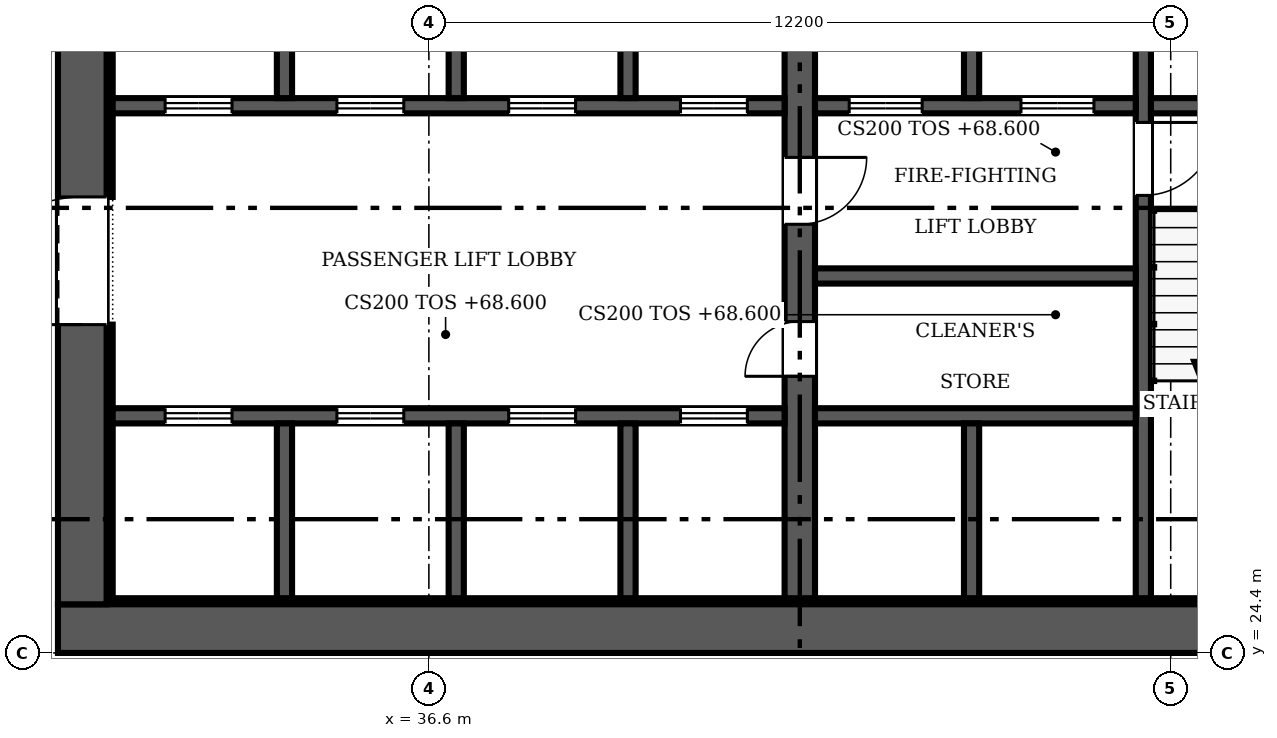
"""IFC4 building model, lengths in metres.
Left out: names, types, materials, properties, quantities, classifications, styles, units other than length and angle.
Written with IfcOpenShell. Run it as: python <this file> out.ifc"""

import sys

from ifc_helpers import new_model, si_unit, direction, frame, frame_2d, origin, place, context, subcontext, project, spatial, rectangle, extrude, source, transform, mapped, element, fill, save


model = new_model("IFC4")
c1 = context("Model", 3, precision=1e-05, world=origin(), true_north=direction((0.0, 1.0)))
c2 = subcontext(c1, "Body", "Model", "MODEL_VIEW")
j1 = project(units=[si_unit("LENGTHUNIT", "METRE"), si_unit("PLANEANGLEUNIT", "RADIAN")], contexts=[c1])
p1 = place(None, origin())
s1 = spatial("IfcSite", under=j1, at=p1, CompositionType="ELEMENT")
p2 = place(p1, origin())
s2 = spatial("IfcBuilding", under=s1, at=p2, CompositionType="ELEMENT")
p3 = place(p2, frame((0.0, 0.0, 68.6)))
s3 = spatial("IfcBuildingStorey", under=s2, at=p3, CompositionType="ELEMENT", Elevation=68.6)
p4 = place(p3, frame((54.9, 24.8, 0.0), z_axis=(0.0, 0.0, 1.0), x_axis=(-1.0, 0.0, 0.0)))
e1 = element("IfcWall", 1, at=p4, inside=s3, PredefinedType="SHEAR", context=c2, shape_type="SweptSolid", body=[
    extrude(rectangle(XDim=24.4, YDim=0.8, at=frame_2d((12.2, 0.0))), origin(), (0.0, 0.0, 1.0), 3.8),
])
m1 = source(origin(), c2, "Body", "SweptSolid", [
    extrude(rectangle(XDim=1.2, YDim=2.1, at=frame_2d((0.6, 1.05))), frame((0.0, 0.41, 0.0), z_axis=(0.0, -1.0, 0.0), x_axis=(1.0, 0.0, 0.0)), (0.0, 0.0, 1.0), 0.82),
])
p5 = place(p4, frame((1.5, 0.0, 0.0)))
e2 = element("IfcOpeningElement", 2, at=p5, cuts=e1, PredefinedType="OPENING", context=c2, shape_type="MappedRepresentation", body=[
    mapped(m1, transform((0.0, 0.0, 0.0), scale=1.0)),
])
p6 = place(p3, frame((30.9, 25.2, 0.0), z_axis=(0.0, 0.0, 1.0), x_axis=(0.0, 1.0, 0.0)))
e3 = element("IfcWall", 3, at=p6, inside=s3, PredefinedType="SHEAR", context=c2, shape_type="SweptSolid", body=[
    extrude(rectangle(XDim=22.8, YDim=0.8, at=frame_2d((11.4, 0.0))), origin(), (0.0, 0.0, 1.0), 3.8),
])
m2 = source(origin(), c2, "Body", "SweptSolid", [
    extrude(rectangle(XDim=2.1, YDim=2.4, at=frame_2d((1.05, 1.2))), frame((0.0, 0.41, 0.0), z_axis=(0.0, -1.0, 0.0), x_axis=(1.0, 0.0, 0.0)), (0.0, 0.0, 1.0), 0.82),
])
p7 = place(p6, frame((4.6, 0.0, 0.0)))
e4 = element("IfcOpeningElement", 4, at=p7, cuts=e3, PredefinedType="OPENING", context=c2, shape_type="MappedRepresentation", body=[
    mapped(m2, transform((0.0, 0.0, 0.0), scale=1.0)),
])
p8 = place(p6, frame((16.1, 0.0, 0.0)))
e5 = element("IfcOpeningElement", 5, at=p8, cuts=e3, PredefinedType="OPENING", context=c2, shape_type="MappedRepresentation", body=[
    mapped(m2, transform((0.0, 0.0, 0.0), scale=1.0)),
])
p9 = place(p3, frame((31.3, 25.25, 0.0), z_axis=(0.0, 0.0, 1.0), x_axis=(1.0, 0.0, 0.0)))
e6 = element("IfcWall", 6, at=p9, inside=s3, PredefinedType="SOLIDWALL", context=c2, shape_type="SweptSolid", body=[
    extrude(rectangle(XDim=20.9, YDim=0.1, at=frame_2d((10.45, 0.0))), origin(), (0.0, 0.0, 1.0), 3.8),
])
p10 = place(p3, frame((31.35, 25.3, 0.0), z_axis=(0.0, 0.0, 1.0), x_axis=(0.0, 1.0, 0.0)))
e7 = element("IfcWall", 7, at=p10, inside=s3, PredefinedType="SOLIDWALL", context=c2, shape_type="SweptSolid", body=[
    extrude(rectangle(XDim=4.5, YDim=0.1, at=frame_2d((2.25, 0.0))), origin(), (0.0, 0.0, 1.0), 3.8),
])
p11 = place(p3, frame((31.35, 31.9, 0.0), z_axis=(0.0, 0.0, 1.0), x_axis=(0.0, 1.0, 0.0)))
e8 = element("IfcWall", 8, at=p11, inside=s3, PredefinedType="SOLIDWALL", context=c2, shape_type="SweptSolid", body=[
    extrude(rectangle(XDim=9.4, YDim=0.1, at=frame_2d((4.7, 0.0))), origin(), (0.0, 0.0, 1.0), 3.8),
])
p12 = place(p3, frame((42.7, 36.35, 0.0), z_axis=(0.0, 0.0, 1.0), x_axis=(0.0, -1.0, 0.0)))
e9 = element("IfcWall", 9, at=p12, inside=s3, PredefinedType="SHEAR", context=c2, shape_type="SweptSolid", body=[
    extrude(rectangle(XDim=11.05, YDim=0.5, at=frame_2d((5.525, 0.0))), origin(), (0.0, 0.0, 1.0), 3.8),
])
m3 = source(origin(), c2, "Body", "SweptSolid", [
    extrude(rectangle(XDim=0.9, YDim=2.1, at=frame_2d((0.45, 1.05))), frame((0.0, 0.26, 0.0), z_axis=(0.0, -1.0, 0.0), x_axis=(1.0, 0.0, 0.0)), (0.0, 0.0, 1.0), 0.52),
])
p13 = place(p12, frame((6.5, 0.0, 0.0)))
e10 = element("IfcOpeningElement", 10, at=p13, cuts=e9, PredefinedType="OPENING", context=c2, shape_type="MappedRepresentation", body=[
    mapped(m3, transform((0.0, 0.0, 0.0), scale=1.0)),
])
m4 = source(origin(), c2, "Body", "SweptSolid", [
    extrude(rectangle(XDim=1.1, YDim=2.1, at=frame_2d((0.55, 1.05))), frame((0.0, 0.26, 0.0), z_axis=(0.0, -1.0, 0.0), x_axis=(1.0, 0.0, 0.0)), (0.0, 0.0, 1.0), 0.52),
])
p14 = place(p12, frame((3.8, 0.0, 0.0)))
e11 = element("IfcOpeningElement", 11, at=p14, cuts=e9, PredefinedType="OPENING", context=c2, shape_type="MappedRepresentation", body=[
    mapped(m4, transform((0.0, 0.0, 0.0), scale=1.0)),
])
p15 = place(p3, frame((48.35, 36.35, 0.0), z_axis=(0.0, 0.0, 1.0), x_axis=(0.0, -1.0, 0.0)))
e12 = element("IfcWall", 12, at=p15, inside=s3, PredefinedType="SOLIDWALL", context=c2, shape_type="SweptSolid", body=[
    extrude(rectangle(XDim=11.05, YDim=0.25, at=frame_2d((5.525, 0.0))), origin(), (0.0, 0.0, 1.0), 3.8),
])
m5 = source(origin(), c2, "Body", "SweptSolid", [
    extrude(rectangle(XDim=1.2, YDim=2.1, at=frame_2d((0.6, 1.05))), frame((0.0, 0.135, 0.0), z_axis=(0.0, -1.0, 0.0), x_axis=(1.0, 0.0, 0.0)), (0.0, 0.0, 1.0), 0.27),
])
p16 = place(p15, frame((3.225, 0.0, 0.0)))
e13 = element("IfcOpeningElement", 13, at=p16, cuts=e12, PredefinedType="OPENING", context=c2, shape_type="MappedRepresentation", body=[
    mapped(m5, transform((0.0, 0.0, 0.0), scale=1.0)),
])
p17 = place(p3, frame((42.45, 33.4, 0.0), z_axis=(0.0, 0.0, 1.0), x_axis=(-1.0, 0.0, 0.0)))
e14 = element("IfcWall", 14, at=p17, inside=s3, PredefinedType="SOLIDWALL", context=c2, shape_type="SweptSolid", body=[
    extrude(rectangle(XDim=11.05, YDim=0.25, at=frame_2d((5.525, 0.0))), origin(), (0.0, 0.0, 1.0), 3.8),
])
m6 = source(origin(), c2, "Body", "SweptSolid", [
    extrude(rectangle(XDim=1.1, YDim=2.1, at=frame_2d((0.55, 1.05))), frame((0.0, 0.135, 0.0), z_axis=(0.0, -1.0, 0.0), x_axis=(1.0, 0.0, 0.0)), (0.0, 0.0, 1.0), 0.27),
])
p18 = place(p17, frame((9.087, 0.0, 0.0)))
e15 = element("IfcOpeningElement", 15, at=p18, cuts=e14, PredefinedType="OPENING", context=c2, shape_type="MappedRepresentation", body=[
    mapped(m6, transform((0.0, 0.0, 0.0), scale=1.0)),
])
p19 = place(p17, frame((6.262, 0.0, 0.0)))
e16 = element("IfcOpeningElement", 16, at=p19, cuts=e14, PredefinedType="OPENING", context=c2, shape_type="MappedRepresentation", body=[
    mapped(m6, transform((0.0, 0.0, 0.0), scale=1.0)),
])
p20 = place(p17, frame((3.438, 0.0, 0.0)))
e17 = element("IfcOpeningElement", 17, at=p20, cuts=e14, PredefinedType="OPENING", context=c2, shape_type="MappedRepresentation", body=[
    mapped(m6, transform((0.0, 0.0, 0.0), scale=1.0)),
])
p21 = place(p17, frame((0.613, 0.0, 0.0)))
e18 = element("IfcOpeningElement", 18, at=p21, cuts=e14, PredefinedType="OPENING", context=c2, shape_type="MappedRepresentation", body=[
    mapped(m6, transform((0.0, 0.0, 0.0), scale=1.0)),
])
p22 = place(p3, frame((48.225, 33.4, 0.0), z_axis=(0.0, 0.0, 1.0), x_axis=(-1.0, 0.0, 0.0)))
e19 = element("IfcWall", 19, at=p22, inside=s3, PredefinedType="SOLIDWALL", context=c2, shape_type="SweptSolid", body=[
    extrude(rectangle(XDim=5.275, YDim=0.25, at=frame_2d((2.638, 0.0))), origin(), (0.0, 0.0, 1.0), 3.8),
])
p23 = place(p22, frame((3.512, 0.0, 0.0)))
e20 = element("IfcOpeningElement", 20, at=p23, cuts=e19, PredefinedType="OPENING", context=c2, shape_type="MappedRepresentation", body=[
    mapped(m5, transform((0.0, 0.0, 0.0), scale=1.0)),
])
p24 = place(p22, frame((0.688, 0.0, 0.0)))
e21 = element("IfcOpeningElement", 21, at=p24, cuts=e19, PredefinedType="OPENING", context=c2, shape_type="MappedRepresentation", body=[
    mapped(m5, transform((0.0, 0.0, 0.0), scale=1.0)),
])
p25 = place(p3, frame((48.475, 33.4, 0.0), z_axis=(0.0, 0.0, 1.0), x_axis=(1.0, 0.0, 0.0)))
e22 = element("IfcWall", 22, at=p25, inside=s3, PredefinedType="SOLIDWALL", context=c2, shape_type="SweptSolid", body=[
    extrude(rectangle(XDim=3.525, YDim=0.25, at=frame_2d((1.762, 0.0))), origin(), (0.0, 0.0, 1.0), 3.8),
])
p26 = place(p3, frame((31.4, 28.3, 0.0), z_axis=(0.0, 0.0, 1.0), x_axis=(1.0, 0.0, 0.0)))
e23 = element("IfcWall", 23, at=p26, inside=s3, PredefinedType="SOLIDWALL", context=c2, shape_type="SweptSolid", body=[
    extrude(rectangle(XDim=11.05, YDim=0.25, at=frame_2d((5.525, 0.0))), origin(), (0.0, 0.0, 1.0), 3.8),
])
p27 = place(p26, frame((0.863, 0.0, 0.0)))
e24 = element("IfcOpeningElement", 24, at=p27, cuts=e23, PredefinedType="OPENING", context=c2, shape_type="MappedRepresentation", body=[
    mapped(m6, transform((0.0, 0.0, 0.0), scale=1.0)),
])
p28 = place(p26, frame((3.688, 0.0, 0.0)))
e25 = element("IfcOpeningElement", 25, at=p28, cuts=e23, PredefinedType="OPENING", context=c2, shape_type="MappedRepresentation", body=[
    mapped(m6, transform((0.0, 0.0, 0.0), scale=1.0)),
])
p29 = place(p26, frame((6.512, 0.0, 0.0)))
e26 = element("IfcOpeningElement", 26, at=p29, cuts=e23, PredefinedType="OPENING", context=c2, shape_type="MappedRepresentation", body=[
    mapped(m6, transform((0.0, 0.0, 0.0), scale=1.0)),
])
p30 = place(p26, frame((9.337, 0.0, 0.0)))
e27 = element("IfcOpeningElement", 27, at=p30, cuts=e23, PredefinedType="OPENING", context=c2, shape_type="MappedRepresentation", body=[
    mapped(m6, transform((0.0, 0.0, 0.0), scale=1.0)),
])
p31 = place(p3, frame((42.95, 28.3, 0.0), z_axis=(0.0, 0.0, 1.0), x_axis=(1.0, 0.0, 0.0)))
e28 = element("IfcWall", 28, at=p31, inside=s3, PredefinedType="SOLIDWALL", context=c2, shape_type="SweptSolid", body=[
    extrude(rectangle(XDim=5.275, YDim=0.25, at=frame_2d((2.638, 0.0))), origin(), (0.0, 0.0, 1.0), 3.8),
])
p32 = place(p3, frame((45.525, 33.525, 0.0), z_axis=(0.0, 0.0, 1.0), x_axis=(0.0, 1.0, 0.0)))
e29 = element("IfcWall", 29, at=p32, inside=s3, PredefinedType="SOLIDWALL", context=c2, shape_type="SweptSolid", body=[
    extrude(rectangle(XDim=2.825, YDim=0.25, at=frame_2d((1.413, 0.0))), origin(), (0.0, 0.0, 1.0), 3.8),
])
p33 = place(p3, frame((42.95, 30.6, 0.0), z_axis=(0.0, 0.0, 1.0), x_axis=(1.0, 0.0, 0.0)))
e30 = element("IfcWall", 30, at=p33, inside=s3, PredefinedType="SOLIDWALL", context=c2, shape_type="SweptSolid", body=[
    extrude(rectangle(XDim=5.275, YDim=0.25, at=frame_2d((2.638, 0.0))), origin(), (0.0, 0.0, 1.0), 3.8),
])
for number, where, z_axis, x_axis in (
    (31, (34.225, 33.525, 0.0), (0.0, 0.0, 1.0), (0.0, 1.0, 0.0)),
    (32, (37.05, 33.525, 0.0), (0.0, 0.0, 1.0), (0.0, 1.0, 0.0)),
    (33, (39.875, 33.525, 0.0), (0.0, 0.0, 1.0), (0.0, 1.0, 0.0)),
):
    element("IfcWall", number, at=place(p3, frame(where, z_axis=z_axis, x_axis=x_axis)), inside=s3, PredefinedType="SOLIDWALL", context=c2, shape_type="SweptSolid", body=[
        extrude(rectangle(XDim=2.825, YDim=0.25, at=frame_2d((1.413, 0.0))), origin(), (0.0, 0.0, 1.0), 3.8),
    ])
for number, where, z_axis, x_axis in (
    (34, (34.225, 25.3, 0.0), (0.0, 0.0, 1.0), (0.0, 1.0, 0.0)),
    (35, (37.05, 25.3, 0.0), (0.0, 0.0, 1.0), (0.0, 1.0, 0.0)),
    (36, (39.875, 25.3, 0.0), (0.0, 0.0, 1.0), (0.0, 1.0, 0.0)),
    (37, (45.525, 25.3, 0.0), (0.0, 0.0, 1.0), (0.0, 1.0, 0.0)),
):
    element("IfcWall", number, at=place(p3, frame(where, z_axis=z_axis, x_axis=x_axis)), inside=s3, PredefinedType="SOLIDWALL", context=c2, shape_type="SweptSolid", body=[
        extrude(rectangle(XDim=2.875, YDim=0.25, at=frame_2d((1.438, 0.0))), origin(), (0.0, 0.0, 1.0), 3.8),
    ])
m7 = source(origin(), c2, "Body", "SweptSolid", [
    extrude(rectangle(XDim=2.1, YDim=2.4, at=frame_2d((1.05, 1.2))), frame((0.0, 0.025, 0.0), z_axis=(0.0, -1.0, 0.0), x_axis=(1.0, 0.0, 0.0)), (0.0, 0.0, 1.0), 0.05),
])
p34 = place(p7, origin())
e38 = element("IfcDoor", 38, at=p34, inside=s3, OperationType="DOUBLE_DOOR_SINGLE_SWING", PredefinedType="DOOR", context=c2, shape_type="MappedRepresentation", body=[
    mapped(m7, transform((0.0, 0.0, 0.0), scale=1.0)),
])
fill(e4, e38)
m8 = source(origin(), c2, "Body", "SweptSolid", [
    extrude(rectangle(XDim=0.9, YDim=2.1, at=frame_2d((0.45, 1.05))), frame((0.0, 0.025, 0.0), z_axis=(0.0, -1.0, 0.0), x_axis=(1.0, 0.0, 0.0)), (0.0, 0.0, 1.0), 0.05),
])
p35 = place(p13, origin())
e39 = element("IfcDoor", 39, at=p35, inside=s3, OperationType="SINGLE_SWING_RIGHT", PredefinedType="DOOR", context=c2, shape_type="MappedRepresentation", body=[
    mapped(m8, transform((0.0, 0.0, 0.0), scale=1.0)),
])
fill(e10, e39)
m9 = source(origin(), c2, "Body", "SweptSolid", [
    extrude(rectangle(XDim=1.1, YDim=2.1, at=frame_2d((0.55, 1.05))), frame((0.0, 0.025, 0.0), z_axis=(0.0, -1.0, 0.0), x_axis=(1.0, 0.0, 0.0)), (0.0, 0.0, 1.0), 0.05),
])
p36 = place(p14, origin())
e40 = element("IfcDoor", 40, at=p36, inside=s3, OperationType="SINGLE_SWING_LEFT", PredefinedType="DOOR", context=c2, shape_type="MappedRepresentation", body=[
    mapped(m9, transform((0.0, 0.0, 0.0), scale=1.0)),
])
fill(e11, e40)
m10 = source(origin(), c2, "Body", "SweptSolid", [
    extrude(rectangle(XDim=1.2, YDim=2.1, at=frame_2d((0.6, 1.05))), frame((0.0, 0.025, 0.0), z_axis=(0.0, -1.0, 0.0), x_axis=(1.0, 0.0, 0.0)), (0.0, 0.0, 1.0), 0.05),
])
p37 = place(p16, origin())
e41 = element("IfcDoor", 41, at=p37, inside=s3, OperationType="SINGLE_SWING_LEFT", PredefinedType="DOOR", context=c2, shape_type="MappedRepresentation", body=[
    mapped(m10, transform((0.0, 0.0, 0.0), scale=1.0)),
])
fill(e13, e41)
p38 = place(p18, origin())
e42 = element("IfcDoor", 42, at=p38, inside=s3, OperationType="DOUBLE_DOOR_SLIDING", PredefinedType="DOOR", context=c2, shape_type="MappedRepresentation", body=[
    mapped(m9, transform((0.0, 0.0, 0.0), scale=1.0)),
])
fill(e15, e42)
p39 = place(p19, origin())
e43 = element("IfcDoor", 43, at=p39, inside=s3, OperationType="DOUBLE_DOOR_SLIDING", PredefinedType="DOOR", context=c2, shape_type="MappedRepresentation", body=[
    mapped(m9, transform((0.0, 0.0, 0.0), scale=1.0)),
])
fill(e16, e43)
p40 = place(p20, origin())
e44 = element("IfcDoor", 44, at=p40, inside=s3, OperationType="DOUBLE_DOOR_SLIDING", PredefinedType="DOOR", context=c2, shape_type="MappedRepresentation", body=[
    mapped(m9, transform((0.0, 0.0, 0.0), scale=1.0)),
])
fill(e17, e44)
p41 = place(p21, origin())
e45 = element("IfcDoor", 45, at=p41, inside=s3, OperationType="DOUBLE_DOOR_SLIDING", PredefinedType="DOOR", context=c2, shape_type="MappedRepresentation", body=[
    mapped(m9, transform((0.0, 0.0, 0.0), scale=1.0)),
])
fill(e18, e45)
p42 = place(p23, origin())
e46 = element("IfcDoor", 46, at=p42, inside=s3, OperationType="DOUBLE_DOOR_SLIDING", PredefinedType="DOOR", context=c2, shape_type="MappedRepresentation", body=[
    mapped(m10, transform((0.0, 0.0, 0.0), scale=1.0)),
])
fill(e20, e46)
p43 = place(p24, origin())
e47 = element("IfcDoor", 47, at=p43, inside=s3, OperationType="DOUBLE_DOOR_SLIDING", PredefinedType="DOOR", context=c2, shape_type="MappedRepresentation", body=[
    mapped(m10, transform((0.0, 0.0, 0.0), scale=1.0)),
])
fill(e21, e47)
p44 = place(p27, origin())
e48 = element("IfcDoor", 48, at=p44, inside=s3, OperationType="DOUBLE_DOOR_SLIDING", PredefinedType="DOOR", context=c2, shape_type="MappedRepresentation", body=[
    mapped(m9, transform((0.0, 0.0, 0.0), scale=1.0)),
])
fill(e24, e48)
p45 = place(p28, origin())
e49 = element("IfcDoor", 49, at=p45, inside=s3, OperationType="DOUBLE_DOOR_SLIDING", PredefinedType="DOOR", context=c2, shape_type="MappedRepresentation", body=[
    mapped(m9, transform((0.0, 0.0, 0.0), scale=1.0)),
])
fill(e25, e49)
p46 = place(p29, origin())
e50 = element("IfcDoor", 50, at=p46, inside=s3, OperationType="DOUBLE_DOOR_SLIDING", PredefinedType="DOOR", context=c2, shape_type="MappedRepresentation", body=[
    mapped(m9, transform((0.0, 0.0, 0.0), scale=1.0)),
])
fill(e26, e50)
p47 = place(p30, origin())
e51 = element("IfcDoor", 51, at=p47, inside=s3, OperationType="DOUBLE_DOOR_SLIDING", PredefinedType="DOOR", context=c2, shape_type="MappedRepresentation", body=[
    mapped(m9, transform((0.0, 0.0, 0.0), scale=1.0)),
])
fill(e27, e51)
save(model, sys.argv[1])
